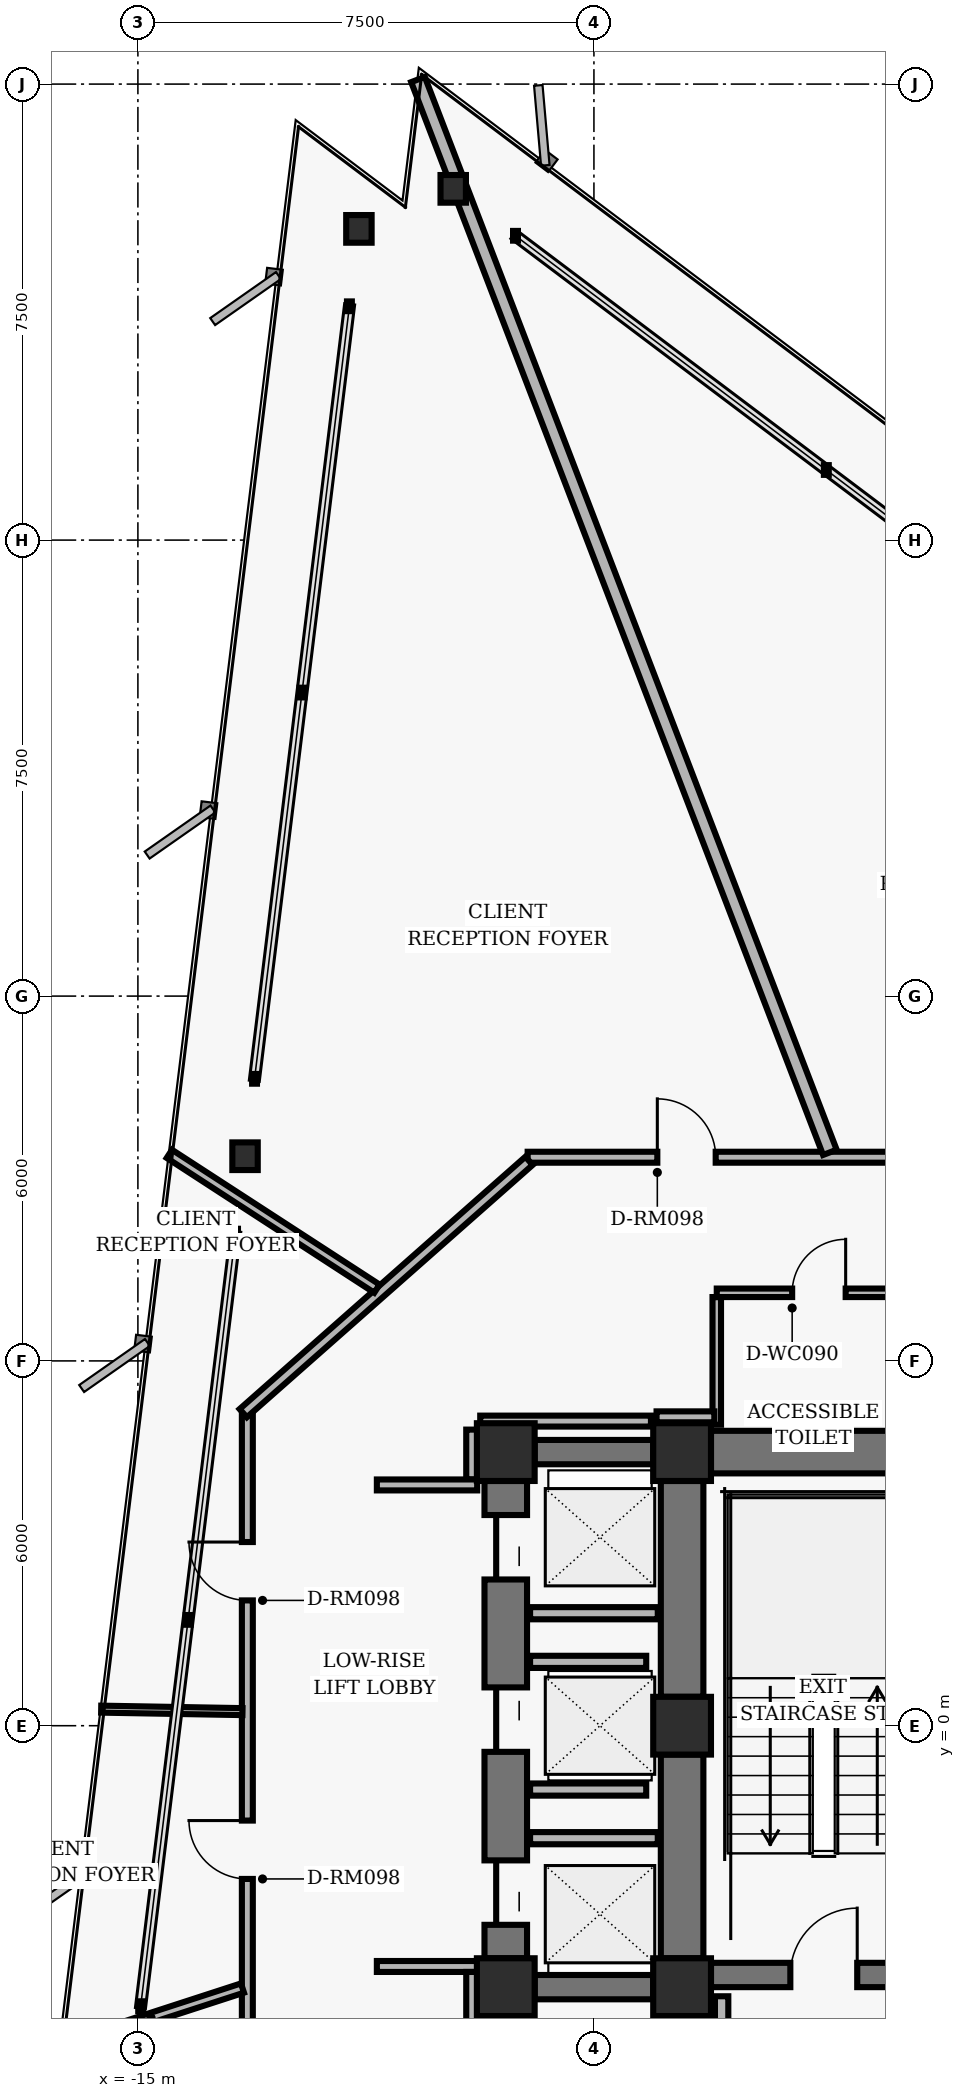
"""IFC4 building model, lengths in metres.
Left out: names, types, materials, properties, quantities, classifications, styles, units other than length and angle.
Written with IfcOpenShell. Run it as: python <this file> out.ifc"""

import sys

from ifc_helpers import new_model, si_unit, direction, frame, frame_2d, origin, origin_2d, place, context, subcontext, project, spatial, rectangle, hollow_rectangle, i_section, extrude, element, fill, save


model = new_model("IFC4")
c1 = context("Model", 3, precision=1e-05, world=origin(), true_north=direction((0.0, 1.0)))
c2 = subcontext(c1, "Body", "Model", "MODEL_VIEW")
j1 = project(units=[si_unit("LENGTHUNIT", "METRE"), si_unit("PLANEANGLEUNIT", "RADIAN")], contexts=[c1])
p1 = place(None, origin())
s1 = spatial("IfcSite", under=j1, at=p1, CompositionType="ELEMENT")
p2 = place(p1, origin())
s2 = spatial("IfcBuilding", under=s1, at=p2, CompositionType="ELEMENT")
p3 = place(p2, frame((0.0, 0.0, 63.04)))
s3 = spatial("IfcBuildingStorey", under=s2, at=p3, CompositionType="ELEMENT", Elevation=63.04)
for number, where, z_axis, x_axis in (
    (1, (-6.05, 4.5, 0.0), (0.0, 0.0, 1.0), (1.0, 0.0, 0.0)),
    (2, (-6.05, 0.0, 0.0), (0.0, 0.0, 1.0), (1.0, 0.0, 0.0)),
    (3, (-6.05, -4.3, 0.0), (0.0, 0.0, 1.0), (1.0, 0.0, 0.0)),
    (4, (-8.95, 4.5, 0.0), (0.0, 0.0, 1.0), (1.0, 0.0, 0.0)),
    (5, (-8.95, -4.3, 0.0), (0.0, 0.0, 1.0), (1.0, 0.0, 0.0)),
):
    element("IfcColumn", number, at=place(p3, frame(where, z_axis=z_axis, x_axis=x_axis)), inside=s3, PredefinedType="COLUMN", context=c2, shape_type="SweptSolid", body=[
        extrude(hollow_rectangle(XDim=0.95, YDim=0.95, WallThickness=0.06, InnerFilletRadius=0.02, OuterFilletRadius=0.04, at=origin_2d()), origin(), (0.0, 0.0, 1.0), 3.36),
    ])
p4 = place(p3, frame((-6.05, 0.475, 0.0), z_axis=(0.0, 0.0, 1.0), x_axis=(0.0, 1.0, 0.0)))
e6 = element("IfcWall", 6, at=p4, inside=s3, PredefinedType="SHEAR", context=c2, shape_type="SweptSolid", body=[
    extrude(rectangle(XDim=3.55, YDim=0.7, at=frame_2d((1.775, 0.0))), origin(), (0.0, 0.0, 1.0), 3.098),
])
p5 = place(p3, frame((-6.05, -3.825, 0.0), z_axis=(0.0, 0.0, 1.0), x_axis=(0.0, 1.0, 0.0)))
e7 = element("IfcWall", 7, at=p5, inside=s3, PredefinedType="SHEAR", context=c2, shape_type="SweptSolid", body=[
    extrude(rectangle(XDim=3.35, YDim=0.7, at=frame_2d((1.675, 0.0))), origin(), (0.0, 0.0, 1.0), 3.098),
])
p6 = place(p3, frame((-5.575, -4.1, 0.0), z_axis=(0.0, 0.0, 1.0), x_axis=(1.0, 0.0, 0.0)))
e8 = element("IfcWall", 8, at=p6, inside=s3, PredefinedType="SHEAR", context=c2, shape_type="SweptSolid", body=[
    extrude(rectangle(XDim=11.15, YDim=0.4, at=frame_2d((5.575, 0.0))), origin(), (0.0, 0.0, 1.0), 3.098),
])
p7 = place(p6, frame((1.305, 0.0, 0.0)))
e9 = element("IfcOpeningElement", 9, at=p7, cuts=e8, PredefinedType="OPENING", context=c2, shape_type="SweptSolid", body=[
    extrude(rectangle(XDim=1.1, YDim=2.04, at=frame_2d((0.55, 1.02))), frame((0.0, 0.21, 0.0), z_axis=(0.0, -1.0, 0.0), x_axis=(1.0, 0.0, 0.0)), (0.0, 0.0, 1.0), 0.42),
])
p8 = place(p6, frame((8.745, 0.0, 0.0)))
e10 = element("IfcOpeningElement", 10, at=p8, cuts=e8, PredefinedType="OPENING", context=c2, shape_type="SweptSolid", body=[
    extrude(rectangle(XDim=1.1, YDim=2.04, at=frame_2d((0.55, 1.02))), frame((0.0, 0.21, 0.0), z_axis=(0.0, -1.0, 0.0), x_axis=(1.0, 0.0, 0.0)), (0.0, 0.0, 1.0), 0.42),
])
p9 = place(p6, frame((4.045, 0.0, 0.0)))
e11 = element("IfcOpeningElement", 11, at=p9, cuts=e8, PredefinedType="OPENING", context=c2, shape_type="SweptSolid", body=[
    extrude(rectangle(XDim=1.06, YDim=2.04, at=frame_2d((0.53, 1.02))), frame((0.0, 0.21, 0.0), z_axis=(0.0, -1.0, 0.0), x_axis=(1.0, 0.0, 0.0)), (0.0, 0.0, 1.0), 0.42),
])
p10 = place(p6, frame((6.045, 0.0, 0.0)))
e12 = element("IfcOpeningElement", 12, at=p10, cuts=e8, PredefinedType="OPENING", context=c2, shape_type="SweptSolid", body=[
    extrude(rectangle(XDim=1.06, YDim=2.04, at=frame_2d((0.53, 1.02))), frame((0.0, 0.21, 0.0), z_axis=(0.0, -1.0, 0.0), x_axis=(1.0, 0.0, 0.0)), (0.0, 0.0, 1.0), 0.42),
])
p11 = place(p3, frame((-5.575, 4.5, 0.0), z_axis=(0.0, 0.0, 1.0), x_axis=(1.0, 0.0, 0.0)))
e13 = element("IfcWall", 13, at=p11, inside=s3, PredefinedType="SHEAR", context=c2, shape_type="SweptSolid", body=[
    extrude(rectangle(XDim=3.525, YDim=0.7, at=frame_2d((1.762, 0.0))), origin(), (0.0, 0.0, 1.0), 3.098),
])
p12 = place(p3, frame((-8.95, -3.825, 0.0), z_axis=(0.0, 0.0, 1.0), x_axis=(0.0, 1.0, 0.0)))
e14 = element("IfcWall", 14, at=p12, inside=s3, PredefinedType="SHEAR", context=c2, shape_type="SweptSolid", body=[
    extrude(rectangle(XDim=7.85, YDim=0.7, at=frame_2d((3.925, 0.0))), origin(), (0.0, 0.0, 1.0), 3.098),
])
p13 = place(p12, frame((0.55, 0.0, 0.0)))
e15 = element("IfcOpeningElement", 15, at=p13, cuts=e14, PredefinedType="OPENING", context=c2, shape_type="SweptSolid", body=[
    extrude(rectangle(XDim=1.06, YDim=2.04, at=frame_2d((0.53, 1.02))), frame((0.0, 0.36, 0.0), z_axis=(0.0, -1.0, 0.0), x_axis=(1.0, 0.0, 0.0)), (0.0, 0.0, 1.0), 0.72),
])
p14 = place(p12, frame((3.395, 0.0, 0.0)))
e16 = element("IfcOpeningElement", 16, at=p14, cuts=e14, PredefinedType="OPENING", context=c2, shape_type="SweptSolid", body=[
    extrude(rectangle(XDim=1.06, YDim=2.04, at=frame_2d((0.53, 1.02))), frame((0.0, 0.36, 0.0), z_axis=(0.0, -1.0, 0.0), x_axis=(1.0, 0.0, 0.0)), (0.0, 0.0, 1.0), 0.72),
])
p15 = place(p12, frame((6.23, 0.0, 0.0)))
e17 = element("IfcOpeningElement", 17, at=p15, cuts=e14, PredefinedType="OPENING", context=c2, shape_type="SweptSolid", body=[
    extrude(rectangle(XDim=1.06, YDim=2.04, at=frame_2d((0.53, 1.02))), frame((0.0, 0.36, 0.0), z_axis=(0.0, -1.0, 0.0), x_axis=(1.0, 0.0, 0.0)), (0.0, 0.0, 1.0), 0.72),
])
for number, where, z_axis, x_axis in (
    (18, (-8.475, 4.5, 0.0), (0.0, 0.0, 1.0), (1.0, 0.0, 0.0)),
    (19, (-8.475, -4.3, 0.0), (0.0, 0.0, 1.0), (1.0, 0.0, 0.0)),
):
    element("IfcWall", number, at=place(p3, frame(where, z_axis=z_axis, x_axis=x_axis)), inside=s3, PredefinedType="SHEAR", context=c2, shape_type="SweptSolid", body=[
        extrude(rectangle(XDim=1.95, YDim=0.4, at=frame_2d((0.975, 0.0))), origin(), (0.0, 0.0, 1.0), 3.098),
    ])
for number, where, z_axis, x_axis in (
    (20, (-9.814, 25.277, 0.0), (0.0, 0.0, 1.0), (1.0, 0.0, 0.0)),
    (21, (-11.365, 24.619, 0.0), (0.0, 0.0, 1.0), (1.0, 0.0, 0.0)),
    (22, (-13.238, 9.366, 0.0), (0.0, 0.0, 1.0), (1.0, 0.0, 0.0)),
):
    element("IfcColumn", number, at=place(p3, frame(where, z_axis=z_axis, x_axis=x_axis)), inside=s3, PredefinedType="COLUMN", context=c2, shape_type="SweptSolid", body=[
        extrude(i_section(OverallWidth=0.418, OverallDepth=0.455, WebThickness=0.042, FlangeThickness=0.068, FilletRadius=0.025, at=origin_2d()), origin(), (0.0, 0.0, 1.0), 3.36),
    ])
p16 = place(p3, frame((-5.4, -7.16, 0.0), z_axis=(0.0, 0.0, 1.0), x_axis=(0.0, 1.0, 0.0)))
e23 = element("IfcWall", 23, at=p16, inside=s3, PredefinedType="PARTITIONING", context=c2, shape_type="SweptSolid", body=[
    extrude(rectangle(XDim=2.71, YDim=0.22, at=frame_2d((1.355, 0.0))), origin(), (0.0, 0.0, 1.0), 3.073),
])
p17 = place(p3, frame((-5.48, 4.95, 0.0), z_axis=(0.0, 0.0, 1.0), x_axis=(0.0, 1.0, 0.0)))
e24 = element("IfcWall", 24, at=p17, inside=s3, PredefinedType="PARTITIONING", context=c2, shape_type="SweptSolid", body=[
    extrude(rectangle(XDim=2.1, YDim=0.14, at=frame_2d((1.05, 0.0))), origin(), (0.0, 0.0, 1.0), 3.073),
])
p18 = place(p3, frame((-5.48, 7.12, 0.0), z_axis=(0.0, 0.0, 1.0), x_axis=(1.0, 0.0, 0.0)))
e25 = element("IfcWall", 25, at=p18, inside=s3, PredefinedType="PARTITIONING", context=c2, shape_type="SweptSolid", body=[
    extrude(rectangle(XDim=3.36, YDim=0.14, at=frame_2d((1.68, 0.0))), origin(), (0.0, 0.0, 1.0), 3.073),
])
p19 = place(p18, frame((1.24, 0.0, 0.0)))
e26 = element("IfcOpeningElement", 26, at=p19, cuts=e25, PredefinedType="OPENING", context=c2, shape_type="SweptSolid", body=[
    extrude(rectangle(XDim=0.88, YDim=2.02, at=frame_2d((0.44, 1.01))), frame((0.0, 0.08, 0.0), z_axis=(0.0, -1.0, 0.0), x_axis=(1.0, 0.0, 0.0)), (0.0, 0.0, 1.0), 0.16),
])
for number, where, z_axis, x_axis in (
    (27, (-8.55, -1.85, 0.0), (0.0, 0.0, 1.0), (1.0, 0.0, 0.0)),
    (28, (-8.55, 1.85, 0.0), (0.0, 0.0, 1.0), (1.0, 0.0, 0.0)),
):
    element("IfcWall", number, at=place(p3, frame(where, z_axis=z_axis, x_axis=x_axis)), inside=s3, PredefinedType="PARTITIONING", context=c2, shape_type="SweptSolid", body=[
        extrude(rectangle(XDim=2.1, YDim=0.2, at=frame_2d((1.05, 0.0))), origin(), (0.0, 0.0, 1.0), 3.073),
    ])
for number, where, z_axis, x_axis in (
    (29, (-8.55, -1.05, 0.0), (0.0, 0.0, 1.0), (1.0, 0.0, 0.0)),
    (30, (-8.55, 1.05, 0.0), (0.0, 0.0, 1.0), (1.0, 0.0, 0.0)),
):
    element("IfcWall", number, at=place(p3, frame(where, z_axis=z_axis, x_axis=x_axis)), inside=s3, PredefinedType="PARTITIONING", context=c2, shape_type="SweptSolid", body=[
        extrude(rectangle(XDim=1.91, YDim=0.2, at=frame_2d((0.955, 0.0))), origin(), (0.0, 0.0, 1.0), 3.073),
    ])
p20 = place(p3, frame((-8.59, 9.35, 0.0), z_axis=(0.0, 0.0, 1.0), x_axis=(1.0, 0.0, 0.0)))
e31 = element("IfcWall", 31, at=p20, inside=s3, PredefinedType="PARTITIONING", context=c2, shape_type="SweptSolid", body=[
    extrude(rectangle(XDim=17.18, YDim=0.18, at=frame_2d((8.59, 0.0))), origin(), (0.0, 0.0, 1.0), 3.073),
])
p21 = place(p20, frame((13.54, 0.0, 0.0)))
e32 = element("IfcOpeningElement", 32, at=p21, cuts=e31, PredefinedType="OPENING", context=c2, shape_type="SweptSolid", body=[
    extrude(rectangle(XDim=0.96, YDim=2.02, at=frame_2d((0.48, 1.01))), frame((0.0, 0.1, 0.0), z_axis=(0.0, -1.0, 0.0), x_axis=(1.0, 0.0, 0.0)), (0.0, 0.0, 1.0), 0.2),
])
p22 = place(p20, frame((7.453, 0.0, 0.0)))
e33 = element("IfcOpeningElement", 33, at=p22, cuts=e31, PredefinedType="OPENING", context=c2, shape_type="SweptSolid", body=[
    extrude(rectangle(XDim=1.18, YDim=2.02, at=frame_2d((0.59, 1.01))), frame((0.0, 0.1, 0.0), z_axis=(0.0, -1.0, 0.0), x_axis=(1.0, 0.0, 0.0)), (0.0, 0.0, 1.0), 0.2),
])
p23 = place(p20, frame((2.133, 0.0, 0.0)))
e34 = element("IfcOpeningElement", 34, at=p23, cuts=e31, PredefinedType="OPENING", context=c2, shape_type="SweptSolid", body=[
    extrude(rectangle(XDim=0.96, YDim=2.02, at=frame_2d((0.48, 1.01))), frame((0.0, 0.1, 0.0), z_axis=(0.0, -1.0, 0.0), x_axis=(1.0, 0.0, 0.0)), (0.0, 0.0, 1.0), 0.2),
])
p24 = place(p3, frame((-13.2, -5.11, 0.0), z_axis=(0.0, 0.0, 1.0), x_axis=(0.0, 1.0, 0.0)))
e35 = element("IfcWall", 35, at=p24, inside=s3, PredefinedType="PARTITIONING", context=c2, shape_type="SweptSolid", body=[
    extrude(rectangle(XDim=10.22, YDim=0.18, at=frame_2d((5.11, 0.0))), origin(), (0.0, 0.0, 1.0), 2.587),
])
p25 = place(p24, frame((2.59, 0.0, 0.0)))
e36 = element("IfcOpeningElement", 36, at=p25, cuts=e35, PredefinedType="OPENING", context=c2, shape_type="SweptSolid", body=[
    extrude(rectangle(XDim=0.96, YDim=2.02, at=frame_2d((0.48, 1.01))), frame((0.0, 0.1, 0.0), z_axis=(0.0, -1.0, 0.0), x_axis=(1.0, 0.0, 0.0)), (0.0, 0.0, 1.0), 0.2),
])
p26 = place(p24, frame((7.171, 0.0, 0.0)))
e37 = element("IfcOpeningElement", 37, at=p26, cuts=e35, PredefinedType="OPENING", context=c2, shape_type="SweptSolid", body=[
    extrude(rectangle(XDim=0.96, YDim=2.02, at=frame_2d((0.48, 1.01))), frame((0.0, 0.1, 0.0), z_axis=(0.0, -1.0, 0.0), x_axis=(1.0, 0.0, 0.0)), (0.0, 0.0, 1.0), 0.2),
])
p27 = place(p3, frame((-13.268, 5.14, 0.0), z_axis=(0.0, 0.0, 1.0), x_axis=(0.749626463267, 0.66186113768, 0.0)))
e38 = element("IfcWall", 38, at=p27, inside=s3, PredefinedType="PARTITIONING", context=c2, shape_type="SweptSolid", body=[
    extrude(rectangle(XDim=6.27, YDim=0.18, at=frame_2d((3.135, 0.0))), origin(), (0.0, 0.0, 1.0), 3.073),
])
p28 = place(p3, frame((-9.51, 4.87, 0.0), z_axis=(0.0, 0.0, 1.0), x_axis=(0.0, -1.0, 0.0)))
e39 = element("IfcWall", 39, at=p28, inside=s3, PredefinedType="PARTITIONING", context=c2, shape_type="SweptSolid", body=[
    extrude(rectangle(XDim=0.82, YDim=0.18, at=frame_2d((0.41, 0.0))), origin(), (0.0, 0.0, 1.0), 3.073),
])
for number, where, z_axis, x_axis in (
    (40, (-9.42, 3.96, 0.0), (0.0, 0.0, 1.0), (-1.0, 0.0, 0.0)),
    (41, (-11.07, -3.96, 0.0), (0.0, 0.0, 1.0), (1.0, 0.0, 0.0)),
):
    element("IfcWall", number, at=place(p3, frame(where, z_axis=z_axis, x_axis=x_axis)), inside=s3, PredefinedType="PARTITIONING", context=c2, shape_type="SweptSolid", body=[
        extrude(rectangle(XDim=1.65, YDim=0.18, at=frame_2d((0.825, 0.0))), origin(), (0.0, 0.0, 1.0), 3.073),
    ])
p29 = place(p3, frame((-9.51, -4.05, 0.0), z_axis=(0.0, 0.0, 1.0), x_axis=(0.0, -1.0, 0.0)))
e42 = element("IfcWall", 42, at=p29, inside=s3, PredefinedType="PARTITIONING", context=c2, shape_type="SweptSolid", body=[
    extrude(rectangle(XDim=0.82, YDim=0.18, at=frame_2d((0.41, 0.0))), origin(), (0.0, 0.0, 1.0), 3.073),
])
p30 = place(p3, frame((-5.52, 5.08, 0.0), z_axis=(0.0, 0.0, 1.0), x_axis=(-1.0, 0.0, 0.0)))
e43 = element("IfcWall", 43, at=p30, inside=s3, PredefinedType="PARTITIONING", context=c2, shape_type="SweptSolid", body=[
    extrude(rectangle(XDim=0.95, YDim=0.18, at=frame_2d((0.475, 0.0))), origin(), (0.0, 0.0, 1.0), 3.073),
])
p31 = place(p3, frame((-6.562, 5.01, 0.0), z_axis=(0.0, 0.0, 1.0), x_axis=(-1.0, 0.0, 0.0)))
e44 = element("IfcWall", 44, at=p31, inside=s3, PredefinedType="PARTITIONING", context=c2, shape_type="SweptSolid", body=[
    extrude(rectangle(XDim=2.808, YDim=0.18, at=frame_2d((1.404, 0.0))), origin(), (0.0, 0.0, 1.0), 3.073),
])
p32 = place(p3, frame((-13.28, -4.315, 0.0), z_axis=(0.0, 0.0, 1.0), x_axis=(-0.951057330934, -0.309014487164, 0.0)))
e45 = element("IfcWall", 45, at=p32, inside=s3, PredefinedType="PARTITIONING", context=c2, shape_type="SweptSolid", body=[
    extrude(rectangle(XDim=3.162, YDim=0.16, at=frame_2d((1.581, 0.0))), origin(), (0.0, 0.0, 1.0), 3.073),
])
p33 = place(p3, frame((-3.62, 9.43, 0.0), z_axis=(0.0, 0.0, 1.0), x_axis=(-0.358366182081, 0.933581104961, 0.0)))
e46 = element("IfcWall", 46, at=p33, inside=s3, PredefinedType="PARTITIONING", context=c2, shape_type="SweptSolid", body=[
    extrude(rectangle(XDim=18.901, YDim=0.24, at=frame_2d((9.45, 0.0))), origin(), (0.0, 0.0, 1.0), 3.073),
])
p34 = place(p3, frame((-11.069, 7.188, 0.0), z_axis=(0.0, 0.0, 1.0), x_axis=(-0.838653238926, 0.544665718436, 0.0)))
e47 = element("IfcWall", 47, at=p34, inside=s3, PredefinedType="PARTITIONING", context=c2, shape_type="SweptSolid", body=[
    extrude(rectangle(XDim=4.07, YDim=0.16, at=frame_2d((2.035, 0.0))), origin(), (0.0, 0.0, 1.0), 2.358),
])
p35 = place(p3, frame((-13.28, 0.232, 0.0), z_axis=(0.0, 0.0, 1.0), x_axis=(-0.999846109686, 0.017543002765, 0.0)))
e48 = element("IfcWall", 48, at=p35, inside=s3, PredefinedType="MOVABLE", context=c2, shape_type="SweptSolid", body=[
    extrude(rectangle(XDim=2.324, YDim=0.115, at=frame_2d((1.162, 0.0))), origin(), (0.0, 0.0, 1.0), 3.073),
])
p36 = place(p7, origin())
e49 = element("IfcDoor", 49, at=p36, inside=s3, OperationType="SINGLE_SWING_RIGHT", PredefinedType="DOOR", context=c2, shape_type="SweptSolid", body=[
    extrude(rectangle(XDim=1.1, YDim=2.04, at=frame_2d((0.55, 1.02))), frame((0.0, 0.025, 0.0), z_axis=(0.0, -1.0, 0.0), x_axis=(1.0, 0.0, 0.0)), (0.0, 0.0, 1.0), 0.05),
])
fill(e9, e49)
p37 = place(p19, origin())
e50 = element("IfcDoor", 50, at=p37, inside=s3, OperationType="SINGLE_SWING_RIGHT", PredefinedType="DOOR", context=c2, shape_type="SweptSolid", body=[
    extrude(rectangle(XDim=0.88, YDim=2.02, at=frame_2d((0.44, 1.01))), frame((0.0, 0.025, 0.0), z_axis=(0.0, -1.0, 0.0), x_axis=(1.0, 0.0, 0.0)), (0.0, 0.0, 1.0), 0.05),
])
fill(e26, e50)
p38 = place(p13, origin())
e51 = element("IfcDoor", 51, at=p38, inside=s3, OperationType="SLIDING_TO_LEFT", PredefinedType="DOOR", context=c2, shape_type="SweptSolid", body=[
    extrude(rectangle(XDim=1.06, YDim=2.04, at=frame_2d((0.53, 1.02))), frame((0.0, 0.025, 0.0), z_axis=(0.0, -1.0, 0.0), x_axis=(1.0, 0.0, 0.0)), (0.0, 0.0, 1.0), 0.05),
])
fill(e15, e51)
p39 = place(p14, origin())
e52 = element("IfcDoor", 52, at=p39, inside=s3, OperationType="SLIDING_TO_RIGHT", PredefinedType="DOOR", context=c2, shape_type="SweptSolid", body=[
    extrude(rectangle(XDim=1.06, YDim=2.04, at=frame_2d((0.53, 1.02))), frame((0.0, 0.025, 0.0), z_axis=(0.0, -1.0, 0.0), x_axis=(1.0, 0.0, 0.0)), (0.0, 0.0, 1.0), 0.05),
])
fill(e16, e52)
p40 = place(p15, origin())
e53 = element("IfcDoor", 53, at=p40, inside=s3, OperationType="SLIDING_TO_LEFT", PredefinedType="DOOR", context=c2, shape_type="SweptSolid", body=[
    extrude(rectangle(XDim=1.06, YDim=2.04, at=frame_2d((0.53, 1.02))), frame((0.0, 0.025, 0.0), z_axis=(0.0, -1.0, 0.0), x_axis=(1.0, 0.0, 0.0)), (0.0, 0.0, 1.0), 0.05),
])
fill(e17, e53)
p41 = place(p25, origin())
e54 = element("IfcDoor", 54, at=p41, inside=s3, OperationType="SINGLE_SWING_RIGHT", PredefinedType="DOOR", context=c2, shape_type="SweptSolid", body=[
    extrude(rectangle(XDim=0.96, YDim=2.02, at=frame_2d((0.48, 1.01))), frame((0.0, 0.025, 0.0), z_axis=(0.0, -1.0, 0.0), x_axis=(1.0, 0.0, 0.0)), (0.0, 0.0, 1.0), 0.05),
])
fill(e36, e54)
p42 = place(p23, origin())
e55 = element("IfcDoor", 55, at=p42, inside=s3, OperationType="SINGLE_SWING_LEFT", PredefinedType="DOOR", context=c2, shape_type="SweptSolid", body=[
    extrude(rectangle(XDim=0.96, YDim=2.02, at=frame_2d((0.48, 1.01))), frame((0.0, 0.025, 0.0), z_axis=(0.0, -1.0, 0.0), x_axis=(1.0, 0.0, 0.0)), (0.0, 0.0, 1.0), 0.05),
])
fill(e34, e55)
p43 = place(p26, origin())
e56 = element("IfcDoor", 56, at=p43, inside=s3, OperationType="SINGLE_SWING_RIGHT", PredefinedType="DOOR", context=c2, shape_type="SweptSolid", body=[
    extrude(rectangle(XDim=0.96, YDim=2.02, at=frame_2d((0.48, 1.01))), frame((0.0, 0.025, 0.0), z_axis=(0.0, -1.0, 0.0), x_axis=(1.0, 0.0, 0.0)), (0.0, 0.0, 1.0), 0.05),
])
fill(e37, e56)
save(model, sys.argv[1])
